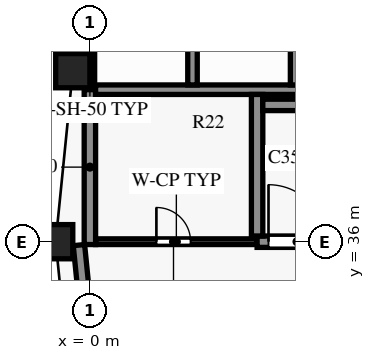
"""IFC4 building model, lengths in metres.
Left out: names, types, materials, properties, quantities, classifications, styles, units other than length and angle.
Written with IfcOpenShell. Run it as: python <this file> out.ifc"""

import sys

from ifc_helpers import new_model, si_unit, direction, frame, frame_2d, origin, origin_2d, place, context, subcontext, project, spatial, rectangle, extrude, element, fill, save


model = new_model("IFC4")
c1 = context("Model", 3, precision=1e-05, world=origin(), true_north=direction((0.0, 1.0)))
c2 = subcontext(c1, "Body", "Model", "MODEL_VIEW")
j1 = project(units=[si_unit("LENGTHUNIT", "METRE"), si_unit("PLANEANGLEUNIT", "RADIAN")], contexts=[c1])
p1 = place(None, origin())
s1 = spatial("IfcSite", under=j1, at=p1, CompositionType="ELEMENT")
p2 = place(p1, origin())
s2 = spatial("IfcBuilding", under=s1, at=p2, CompositionType="ELEMENT")
p3 = place(p2, frame((0.0, 0.0, 256.2)))
s3 = spatial("IfcBuildingStorey", under=s2, at=p3, CompositionType="ELEMENT", Elevation=256.2)
for number, where, z_axis, x_axis in (
    (1, (-0.45, 40.5, 0.0), (0.0, 0.0, 1.0), (-0.1, -0.995, 0.0)),
    (2, (-0.9, 36.0, 0.0), (0.0, 0.0, 1.0), (0.0, -1.0, 0.0)),
):
    element("IfcColumn", number, at=place(p3, frame(where, z_axis=z_axis, x_axis=x_axis)), inside=s3, PredefinedType="COLUMN", context=c2, shape_type="SweptSolid", body=[
        extrude(rectangle(XDim=0.9, YDim=0.9, at=origin_2d()), origin(), (0.0, 0.0, 1.0), 3.8),
    ])
p4 = place(p3, frame((0.604, 26.985, 0.0), z_axis=(0.0, 0.0, 1.0), x_axis=(-0.099509108728, 0.995036651225, 0.0)))
e3 = element("IfcWall", 3, at=p4, inside=s3, PredefinedType="SOLIDWALL", context=c2, shape_type="SweptSolid", body=[
    extrude(rectangle(XDim=8.97, YDim=0.3, at=frame_2d((4.485, 0.0))), origin(), (0.0, 0.0, 1.0), 3.15),
])
p5 = place(p4, frame((0.686, 0.0, 0.15)))
e4 = element("IfcOpeningElement", 4, at=p5, cuts=e3, PredefinedType="OPENING", context=c2, shape_type="SweptSolid", body=[
    extrude(rectangle(XDim=3.3, YDim=2.4, at=frame_2d((1.65, 1.2))), frame((0.0, 0.16, 0.0), z_axis=(0.0, -1.0, 0.0), x_axis=(1.0, 0.0, 0.0)), (0.0, 0.0, 1.0), 0.32),
])
p6 = place(p4, frame((5.958, 0.0, 0.75)))
e5 = element("IfcOpeningElement", 5, at=p6, cuts=e3, PredefinedType="OPENING", context=c2, shape_type="SweptSolid", body=[
    extrude(rectangle(XDim=1.8, YDim=1.8, at=frame_2d((0.9, 0.9))), frame((0.0, 0.16, 0.0), z_axis=(0.0, -1.0, 0.0), x_axis=(1.0, 0.0, 0.0)), (0.0, 0.0, 1.0), 0.32),
])
p7 = place(p3, frame((0.15, 36.0, 0.0), z_axis=(0.0, 0.0, 1.0), x_axis=(1.0, 0.0, 0.0)))
e6 = element("IfcWall", 6, at=p7, inside=s3, PredefinedType="PARTITIONING", context=c2, shape_type="SweptSolid", body=[
    extrude(rectangle(XDim=4.25, YDim=0.15, at=frame_2d((2.125, 0.0))), origin(), (0.0, 0.0, 1.0), 3.5),
])
p8 = place(p7, frame((1.6, 0.0, 0.0)))
e7 = element("IfcOpeningElement", 7, at=p8, cuts=e6, PredefinedType="OPENING", context=c2, shape_type="SweptSolid", body=[
    extrude(rectangle(XDim=0.9, YDim=2.1, at=frame_2d((0.45, 1.05))), frame((0.0, 0.085, 0.0), z_axis=(0.0, -1.0, 0.0), x_axis=(1.0, 0.0, 0.0)), (0.0, 0.0, 1.0), 0.17),
])
p9 = place(p3, frame((4.4, 36.0, 0.0), z_axis=(0.0, 0.0, 1.0), x_axis=(1.0, 0.0, 0.0)))
e8 = element("IfcWall", 8, at=p9, inside=s3, PredefinedType="SHEAR", context=c2, shape_type="SweptSolid", body=[
    extrude(rectangle(XDim=8.0, YDim=0.3, at=frame_2d((4.0, 0.0))), origin(), (0.0, 0.0, 1.0), 3.5),
])
p10 = place(p9, frame((0.3, 0.0, 0.0)))
e9 = element("IfcOpeningElement", 9, at=p10, cuts=e8, PredefinedType="OPENING", context=c2, shape_type="SweptSolid", body=[
    extrude(rectangle(XDim=1.5, YDim=2.2, at=frame_2d((0.75, 1.1))), frame((0.0, 0.16, 0.0), z_axis=(0.0, -1.0, 0.0), x_axis=(1.0, 0.0, 0.0)), (0.0, 0.0, 1.0), 0.32),
])
p11 = place(p3, frame((4.55, 39.6, 0.0), z_axis=(0.0, 0.0, 1.0), x_axis=(1.0, 0.0, 0.0)))
e10 = element("IfcWall", 10, at=p11, inside=s3, PredefinedType="SHEAR", context=c2, shape_type="SweptSolid", body=[
    extrude(rectangle(XDim=7.7, YDim=0.3, at=frame_2d((3.85, 0.0))), origin(), (0.0, 0.0, 1.0), 3.5),
])
p12 = place(p3, frame((0.15, 40.0, 0.0), z_axis=(0.0, 0.0, 1.0), x_axis=(1.0, 0.0, 0.0)))
e11 = element("IfcWall", 11, at=p12, inside=s3, PredefinedType="SHEAR", context=c2, shape_type="SweptSolid", body=[
    extrude(rectangle(XDim=7.95, YDim=0.25, at=frame_2d((3.975, 0.0))), origin(), (0.0, 0.0, 1.0), 3.5),
])
p13 = place(p3, frame((0.0, 35.925, 0.0), z_axis=(0.0, 0.0, 1.0), x_axis=(0.0, 1.0, 0.0)))
e12 = element("IfcWall", 12, at=p13, inside=s3, PredefinedType="SHEAR", context=c2, shape_type="SweptSolid", body=[
    extrude(rectangle(XDim=4.075, YDim=0.3, at=frame_2d((2.038, 0.0))), origin(), (0.0, 0.0, 1.0), 3.5),
])
p14 = place(p3, frame((0.0, 40.0, 0.0), z_axis=(0.0, 0.0, 1.0), x_axis=(0.0, 1.0, 0.0)))
e13 = element("IfcWall", 13, at=p14, inside=s3, PredefinedType="SHEAR", context=c2, shape_type="SweptSolid", body=[
    extrude(rectangle(XDim=3.325, YDim=0.25, at=frame_2d((1.663, 0.0))), origin(), (0.0, 0.0, 1.0), 3.5),
])
p15 = place(p3, frame((2.7, 40.125, 0.0), z_axis=(0.0, 0.0, 1.0), x_axis=(0.0, 1.0, 0.0)))
e14 = element("IfcWall", 14, at=p15, inside=s3, PredefinedType="SHEAR", context=c2, shape_type="SweptSolid", body=[
    extrude(rectangle(XDim=2.95, YDim=0.25, at=frame_2d((1.475, 0.0))), origin(), (0.0, 0.0, 1.0), 3.5),
])
p16 = place(p3, frame((4.4, 36.15, 0.0), z_axis=(0.0, 0.0, 1.0), x_axis=(0.0, 1.0, 0.0)))
e15 = element("IfcWall", 15, at=p16, inside=s3, PredefinedType="SHEAR", context=c2, shape_type="SweptSolid", body=[
    extrude(rectangle(XDim=3.725, YDim=0.3, at=frame_2d((1.863, 0.0))), origin(), (0.0, 0.0, 1.0), 3.5),
])
p17 = place(p3, frame((5.4, 40.125, 0.0), z_axis=(0.0, 0.0, 1.0), x_axis=(0.0, 1.0, 0.0)))
e16 = element("IfcWall", 16, at=p17, inside=s3, PredefinedType="SHEAR", context=c2, shape_type="SweptSolid", body=[
    extrude(rectangle(XDim=2.95, YDim=0.25, at=frame_2d((1.475, 0.0))), origin(), (0.0, 0.0, 1.0), 3.5),
])
p18 = place(p8, origin())
e17 = element("IfcDoor", 17, at=p18, inside=s3, OperationType="SINGLE_SWING_LEFT", PredefinedType="DOOR", context=c2, shape_type="SweptSolid", body=[
    extrude(rectangle(XDim=0.9, YDim=2.1, at=frame_2d((0.45, 1.05))), frame((0.0, 0.025, 0.0), z_axis=(0.0, -1.0, 0.0), x_axis=(1.0, 0.0, 0.0)), (0.0, 0.0, 1.0), 0.05),
])
fill(e7, e17)
p19 = place(p10, origin())
e18 = element("IfcDoor", 18, at=p19, inside=s3, OperationType="SINGLE_SWING_RIGHT", PredefinedType="DOOR", context=c2, shape_type="SweptSolid", body=[
    extrude(rectangle(XDim=1.5, YDim=2.2, at=frame_2d((0.75, 1.1))), frame((0.0, 0.025, 0.0), z_axis=(0.0, -1.0, 0.0), x_axis=(1.0, 0.0, 0.0)), (0.0, 0.0, 1.0), 0.05),
])
fill(e9, e18)
save(model, sys.argv[1])
